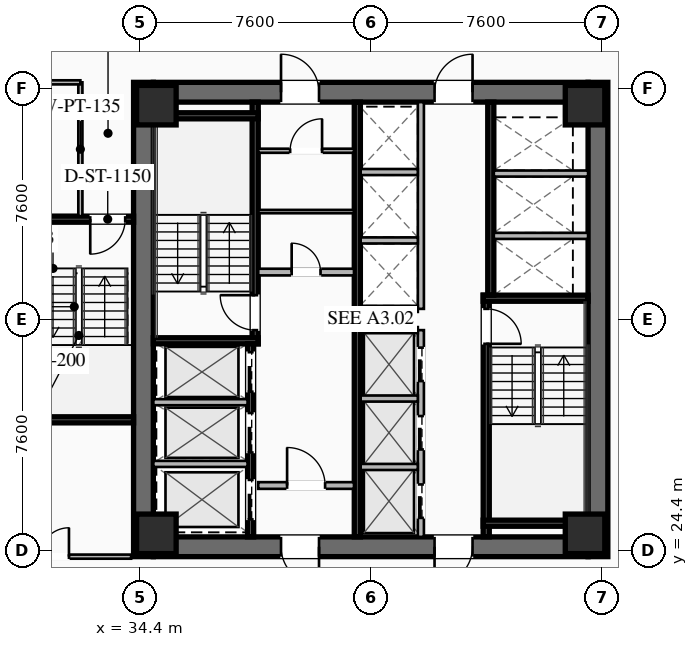
"""IFC4 building model, lengths in metres.
Left out: names, types, materials, properties, quantities, classifications, styles, units other than length and angle.
Written with IfcOpenShell. Run it as: python <this file> out.ifc"""

import sys

from ifc_helpers import new_model, si_unit, direction, frame, frame_2d, origin, origin_2d, place, context, subcontext, project, spatial, rectangle, hollow_rectangle, extrude, element, fill, save


model = new_model("IFC4")
c1 = context("Model", 3, precision=1e-05, world=origin(), true_north=direction((0.0, 1.0)))
c2 = subcontext(c1, "Body", "Model", "MODEL_VIEW")
j1 = project(units=[si_unit("LENGTHUNIT", "METRE"), si_unit("PLANEANGLEUNIT", "RADIAN")], contexts=[c1])
p1 = place(None, origin())
s1 = spatial("IfcSite", under=j1, at=p1, CompositionType="ELEMENT")
p2 = place(p1, origin())
s2 = spatial("IfcBuilding", under=s1, at=p2, CompositionType="ELEMENT")
p3 = place(p2, frame((0.0, 0.0, 70.75)))
s3 = spatial("IfcBuildingStorey", under=s2, at=p3, CompositionType="ELEMENT", Elevation=70.75)
for number, where, z_axis, x_axis in (
    (1, (34.525, 24.2, 0.0), (0.0, 0.0, 1.0), (0.0, 1.0, 0.0)),
    (2, (49.475, 39.8, 0.0), (0.0, 0.0, 1.0), (0.0, -1.0, 0.0)),
):
    element("IfcWall", number, at=place(p3, frame(where, z_axis=z_axis, x_axis=x_axis)), inside=s3, PredefinedType="SHEAR", context=c2, shape_type="SweptSolid", body=[
        extrude(rectangle(XDim=15.6, YDim=0.65, at=frame_2d((7.8, 0.0))), origin(), (0.0, 0.0, 1.0), 3.55),
    ])
p4 = place(p3, frame((49.15, 24.525, 0.0), z_axis=(0.0, 0.0, 1.0), x_axis=(-1.0, 0.0, 0.0)))
e3 = element("IfcWall", 3, at=p4, inside=s3, PredefinedType="SHEAR", context=c2, shape_type="SweptSolid", body=[
    extrude(rectangle(XDim=14.3, YDim=0.65, at=frame_2d((7.15, 0.0))), origin(), (0.0, 0.0, 1.0), 3.55),
])
p5 = place(p4, frame((8.85, 0.0, 0.0)))
e4 = element("IfcOpeningElement", 4, at=p5, cuts=e3, PredefinedType="OPENING", context=c2, shape_type="SweptSolid", body=[
    extrude(rectangle(XDim=1.25, YDim=2.25, at=frame_2d((0.625, 1.125))), frame((0.0, 0.335, 0.0), z_axis=(0.0, -1.0, 0.0), x_axis=(1.0, 0.0, 0.0)), (0.0, 0.0, 1.0), 0.67),
])
p6 = place(p4, frame((3.8, 0.0, 0.0)))
e5 = element("IfcOpeningElement", 5, at=p6, cuts=e3, PredefinedType="OPENING", context=c2, shape_type="SweptSolid", body=[
    extrude(rectangle(XDim=1.25, YDim=2.25, at=frame_2d((0.625, 1.125))), frame((0.0, 0.335, 0.0), z_axis=(0.0, -1.0, 0.0), x_axis=(1.0, 0.0, 0.0)), (0.0, 0.0, 1.0), 0.67),
])
p7 = place(p3, frame((34.85, 39.475, 0.0), z_axis=(0.0, 0.0, 1.0), x_axis=(1.0, 0.0, 0.0)))
e6 = element("IfcWall", 6, at=p7, inside=s3, PredefinedType="SHEAR", context=c2, shape_type="SweptSolid", body=[
    extrude(rectangle(XDim=14.3, YDim=0.65, at=frame_2d((7.15, 0.0))), origin(), (0.0, 0.0, 1.0), 3.55),
])
p8 = place(p7, frame((4.2, 0.0, 0.0)))
e7 = element("IfcOpeningElement", 7, at=p8, cuts=e6, PredefinedType="OPENING", context=c2, shape_type="SweptSolid", body=[
    extrude(rectangle(XDim=1.25, YDim=2.25, at=frame_2d((0.625, 1.125))), frame((0.0, 0.335, 0.0), z_axis=(0.0, -1.0, 0.0), x_axis=(1.0, 0.0, 0.0)), (0.0, 0.0, 1.0), 0.67),
])
p9 = place(p7, frame((9.25, 0.0, 0.0)))
e8 = element("IfcOpeningElement", 8, at=p9, cuts=e6, PredefinedType="OPENING", context=c2, shape_type="SweptSolid", body=[
    extrude(rectangle(XDim=1.25, YDim=2.25, at=frame_2d((0.625, 1.125))), frame((0.0, 0.335, 0.0), z_axis=(0.0, -1.0, 0.0), x_axis=(1.0, 0.0, 0.0)), (0.0, 0.0, 1.0), 0.67),
])
for number, where, z_axis, x_axis in (
    (9, (34.95, 24.95, 0.0), (0.0, 0.0, 1.0), (1.0, 0.0, 0.0)),
    (10, (49.05, 24.95, 0.0), (0.0, 0.0, 1.0), (1.0, 0.0, 0.0)),
    (11, (49.05, 39.05, 0.0), (0.0, 0.0, 1.0), (1.0, 0.0, 0.0)),
    (12, (34.95, 39.05, 0.0), (0.0, 0.0, 1.0), (1.0, 0.0, 0.0)),
):
    element("IfcColumn", number, at=place(p3, frame(where, z_axis=z_axis, x_axis=x_axis)), inside=s3, PredefinedType="COLUMN", context=c2, shape_type="SweptSolid", body=[
        extrude(hollow_rectangle(XDim=1.3, YDim=1.3, WallThickness=0.05, at=origin_2d()), origin(), (0.0, 0.0, 1.0), 3.35),
    ])
p10 = place(p3, frame((38.2, 31.2, 0.0), z_axis=(0.0, 0.0, 1.0), x_axis=(0.0, 1.0, 0.0)))
e13 = element("IfcWall", 13, at=p10, inside=s3, PredefinedType="SHEAR", context=c2, shape_type="SweptSolid", body=[
    extrude(rectangle(XDim=7.95, YDim=0.2, at=frame_2d((3.975, 0.0))), origin(), (0.0, 0.0, 1.0), 3.35),
])
p11 = place(p10, frame((0.45, 0.0, 0.0)))
e14 = element("IfcOpeningElement", 14, at=p11, cuts=e13, PredefinedType="OPENING", context=c2, shape_type="SweptSolid", body=[
    extrude(rectangle(XDim=1.15, YDim=2.2, at=frame_2d((0.575, 1.1))), frame((0.0, 0.11, 0.0), z_axis=(0.0, -1.0, 0.0), x_axis=(1.0, 0.0, 0.0)), (0.0, 0.0, 1.0), 0.22),
])
for number, where, z_axis, x_axis in (
    (15, (34.85, 31.3, 0.0), (0.0, 0.0, 1.0), (1.0, 0.0, 0.0)),
    (16, (34.85, 38.7, 0.0), (0.0, 0.0, 1.0), (1.0, 0.0, 0.0)),
):
    element("IfcWall", number, at=place(p3, frame(where, z_axis=z_axis, x_axis=x_axis)), inside=s3, PredefinedType="SHEAR", context=c2, shape_type="SweptSolid", body=[
        extrude(rectangle(XDim=3.45, YDim=0.2, at=frame_2d((1.725, 0.0))), origin(), (0.0, 0.0, 1.0), 3.35),
    ])
p12 = place(p3, frame((45.8, 32.8, 0.0), z_axis=(0.0, 0.0, 1.0), x_axis=(0.0, -1.0, 0.0)))
e17 = element("IfcWall", 17, at=p12, inside=s3, PredefinedType="SHEAR", context=c2, shape_type="SweptSolid", body=[
    extrude(rectangle(XDim=7.95, YDim=0.2, at=frame_2d((3.975, 0.0))), origin(), (0.0, 0.0, 1.0), 3.35),
])
p13 = place(p12, frame((0.45, 0.0, 0.0)))
e18 = element("IfcOpeningElement", 18, at=p13, cuts=e17, PredefinedType="OPENING", context=c2, shape_type="SweptSolid", body=[
    extrude(rectangle(XDim=1.15, YDim=2.2, at=frame_2d((0.575, 1.1))), frame((0.0, 0.11, 0.0), z_axis=(0.0, -1.0, 0.0), x_axis=(1.0, 0.0, 0.0)), (0.0, 0.0, 1.0), 0.22),
])
for number, where, z_axis, x_axis in (
    (19, (45.7, 32.7, 0.0), (0.0, 0.0, 1.0), (1.0, 0.0, 0.0)),
    (20, (45.7, 25.3, 0.0), (0.0, 0.0, 1.0), (1.0, 0.0, 0.0)),
):
    element("IfcWall", number, at=place(p3, frame(where, z_axis=z_axis, x_axis=x_axis)), inside=s3, PredefinedType="SHEAR", context=c2, shape_type="SweptSolid", body=[
        extrude(rectangle(XDim=3.45, YDim=0.2, at=frame_2d((1.725, 0.0))), origin(), (0.0, 0.0, 1.0), 3.35),
    ])
p14 = place(p3, frame((41.56, 24.85, 0.0), z_axis=(0.0, 0.0, 1.0), x_axis=(0.0, 1.0, 0.0)))
e21 = element("IfcWall", 21, at=p14, inside=s3, PredefinedType="SHEAR", context=c2, shape_type="SweptSolid", body=[
    extrude(rectangle(XDim=14.3, YDim=0.2, at=frame_2d((7.15, 0.0))), origin(), (0.0, 0.0, 1.0), 3.35),
])
p15 = place(p3, frame((38.3, 33.56, 0.0), z_axis=(0.0, 0.0, 1.0), x_axis=(1.0, 0.0, 0.0)))
e22 = element("IfcWall", 22, at=p15, inside=s3, PredefinedType="SOLIDWALL", context=c2, shape_type="SweptSolid", body=[
    extrude(rectangle(XDim=3.15, YDim=0.22, at=frame_2d((1.575, 0.0))), origin(), (0.0, 0.0, 1.0), 2.703),
])
p16 = place(p15, frame((1.1, 0.0, 0.0)))
e23 = element("IfcOpeningElement", 23, at=p16, cuts=e22, PredefinedType="OPENING", context=c2, shape_type="SweptSolid", body=[
    extrude(rectangle(XDim=0.95, YDim=2.05, at=frame_2d((0.475, 1.025))), frame((0.0, 0.12, 0.0), z_axis=(0.0, -1.0, 0.0), x_axis=(1.0, 0.0, 0.0)), (0.0, 0.0, 1.0), 0.24),
])
p17 = place(p3, frame((38.3, 26.54, 0.0), z_axis=(0.0, 0.0, 1.0), x_axis=(1.0, 0.0, 0.0)))
e24 = element("IfcWall", 24, at=p17, inside=s3, PredefinedType="SOLIDWALL", context=c2, shape_type="SweptSolid", body=[
    extrude(rectangle(XDim=3.15, YDim=0.22, at=frame_2d((1.575, 0.0))), origin(), (0.0, 0.0, 1.0), 2.703),
])
p18 = place(p17, frame((0.95, 0.0, 0.0)))
e25 = element("IfcOpeningElement", 25, at=p18, cuts=e24, PredefinedType="OPENING", context=c2, shape_type="SweptSolid", body=[
    extrude(rectangle(XDim=1.25, YDim=2.25, at=frame_2d((0.625, 1.125))), frame((0.0, 0.12, 0.0), z_axis=(0.0, -1.0, 0.0), x_axis=(1.0, 0.0, 0.0)), (0.0, 0.0, 1.0), 0.24),
])
p19 = place(p3, frame((38.05, 24.85, 0.0), z_axis=(0.0, 0.0, 1.0), x_axis=(0.0, 1.0, 0.0)))
e26 = element("IfcWall", 26, at=p19, inside=s3, PredefinedType="SHEAR", context=c2, shape_type="SweptSolid", body=[
    extrude(rectangle(XDim=6.35, YDim=0.2, at=frame_2d((3.175, 0.0))), origin(), (0.0, 0.0, 1.0), 3.35),
])
p20 = place(p19, frame((4.775, 0.0, 0.0)))
e27 = element("IfcOpeningElement", 27, at=p20, cuts=e26, PredefinedType="OPENING", context=c2, shape_type="SweptSolid", body=[
    extrude(rectangle(XDim=1.3, YDim=2.25, at=frame_2d((0.65, 1.125))), frame((0.0, 0.11, 0.0), z_axis=(0.0, -1.0, 0.0), x_axis=(1.0, 0.0, 0.0)), (0.0, 0.0, 1.0), 0.22),
])
p21 = place(p19, frame((2.775, 0.0, 0.0)))
e28 = element("IfcOpeningElement", 28, at=p21, cuts=e26, PredefinedType="OPENING", context=c2, shape_type="SweptSolid", body=[
    extrude(rectangle(XDim=1.3, YDim=2.25, at=frame_2d((0.65, 1.125))), frame((0.0, 0.11, 0.0), z_axis=(0.0, -1.0, 0.0), x_axis=(1.0, 0.0, 0.0)), (0.0, 0.0, 1.0), 0.22),
])
p22 = place(p19, frame((0.575, 0.0, 0.0)))
e29 = element("IfcOpeningElement", 29, at=p22, cuts=e26, PredefinedType="OPENING", context=c2, shape_type="SweptSolid", body=[
    extrude(rectangle(XDim=1.3, YDim=2.25, at=frame_2d((0.65, 1.125))), frame((0.0, 0.11, 0.0), z_axis=(0.0, -1.0, 0.0), x_axis=(1.0, 0.0, 0.0)), (0.0, 0.0, 1.0), 0.22),
])
for number, where, z_axis, x_axis in (
    (30, (34.85, 27.25, 0.0), (0.0, 0.0, 1.0), (1.0, 0.0, 0.0)),
    (31, (34.85, 29.28, 0.0), (0.0, 0.0, 1.0), (1.0, 0.0, 0.0)),
):
    element("IfcWall", number, at=place(p3, frame(where, z_axis=z_axis, x_axis=x_axis)), inside=s3, PredefinedType="SOLIDWALL", context=c2, shape_type="SweptSolid", body=[
        extrude(rectangle(XDim=3.1, YDim=0.2, at=frame_2d((1.55, 0.0))), origin(), (0.0, 0.0, 1.0), 3.35),
    ])
p23 = place(p3, frame((45.95, 39.15, 0.0), z_axis=(0.0, 0.0, 1.0), x_axis=(0.0, -1.0, 0.0)))
e32 = element("IfcWall", 32, at=p23, inside=s3, PredefinedType="SHEAR", context=c2, shape_type="SweptSolid", body=[
    extrude(rectangle(XDim=6.35, YDim=0.2, at=frame_2d((3.175, 0.0))), origin(), (0.0, 0.0, 1.0), 3.35),
])
for number, where, z_axis, x_axis in (
    (33, (46.05, 34.75, 0.0), (0.0, 0.0, 1.0), (1.0, 0.0, 0.0)),
    (34, (46.05, 36.8, 0.0), (0.0, 0.0, 1.0), (1.0, 0.0, 0.0)),
):
    element("IfcWall", number, at=place(p3, frame(where, z_axis=z_axis, x_axis=x_axis)), inside=s3, PredefinedType="SOLIDWALL", context=c2, shape_type="SweptSolid", body=[
        extrude(rectangle(XDim=3.1, YDim=0.2, at=frame_2d((1.55, 0.0))), origin(), (0.0, 0.0, 1.0), 3.35),
    ])
p24 = place(p3, frame((38.3, 37.55, 0.0), z_axis=(0.0, 0.0, 1.0), x_axis=(1.0, 0.0, 0.0)))
e35 = element("IfcWall", 35, at=p24, inside=s3, PredefinedType="PARTITIONING", context=c2, shape_type="SweptSolid", body=[
    extrude(rectangle(XDim=3.15, YDim=0.135, at=frame_2d((1.575, 0.0))), origin(), (0.0, 0.0, 1.0), 2.703),
])
p25 = place(p24, frame((1.05, 0.0, 0.0)))
e36 = element("IfcOpeningElement", 36, at=p25, cuts=e35, PredefinedType="OPENING", context=c2, shape_type="SweptSolid", body=[
    extrude(rectangle(XDim=1.05, YDim=2.2, at=frame_2d((0.525, 1.1))), frame((0.0, 0.077, 0.0), z_axis=(0.0, -1.0, 0.0), x_axis=(1.0, 0.0, 0.0)), (0.0, 0.0, 1.0), 0.155),
])
p26 = place(p3, frame((38.3, 35.55, 0.0), z_axis=(0.0, 0.0, 1.0), x_axis=(1.0, 0.0, 0.0)))
e37 = element("IfcWall", 37, at=p26, inside=s3, PredefinedType="PARTITIONING", context=c2, shape_type="SweptSolid", body=[
    extrude(rectangle(XDim=3.15, YDim=0.11, at=frame_2d((1.575, 0.0))), origin(), (0.0, 0.0, 1.0), 2.703),
])
p27 = place(p3, frame((43.65, 24.85, 0.0), z_axis=(0.0, 0.0, 1.0), x_axis=(0.0, 1.0, 0.0)))
e38 = element("IfcWall", 38, at=p27, inside=s3, PredefinedType="SOLIDWALL", context=c2, shape_type="SweptSolid", body=[
    extrude(rectangle(XDim=6.8, YDim=0.2, at=frame_2d((3.4, 0.0))), origin(), (0.0, 0.0, 1.0), 3.35),
])
p28 = place(p27, frame((0.625, 0.0, 0.0)))
e39 = element("IfcOpeningElement", 39, at=p28, cuts=e38, PredefinedType="OPENING", context=c2, shape_type="SweptSolid", body=[
    extrude(rectangle(XDim=1.1, YDim=2.2, at=frame_2d((0.55, 1.1))), frame((0.0, 0.11, 0.0), z_axis=(0.0, -1.0, 0.0), x_axis=(1.0, 0.0, 0.0)), (0.0, 0.0, 1.0), 0.22),
])
p29 = place(p27, frame((2.875, 0.0, 0.0)))
e40 = element("IfcOpeningElement", 40, at=p29, cuts=e38, PredefinedType="OPENING", context=c2, shape_type="SweptSolid", body=[
    extrude(rectangle(XDim=1.1, YDim=2.2, at=frame_2d((0.55, 1.1))), frame((0.0, 0.11, 0.0), z_axis=(0.0, -1.0, 0.0), x_axis=(1.0, 0.0, 0.0)), (0.0, 0.0, 1.0), 0.22),
])
p30 = place(p27, frame((5.125, 0.0, 0.0)))
e41 = element("IfcOpeningElement", 41, at=p30, cuts=e38, PredefinedType="OPENING", context=c2, shape_type="SweptSolid", body=[
    extrude(rectangle(XDim=1.1, YDim=2.2, at=frame_2d((0.55, 1.1))), frame((0.0, 0.11, 0.0), z_axis=(0.0, -1.0, 0.0), x_axis=(1.0, 0.0, 0.0)), (0.0, 0.0, 1.0), 0.22),
])
for number, where, z_axis, x_axis in (
    (42, (41.67, 27.15, 0.0), (0.0, 0.0, 1.0), (1.0, 0.0, 0.0)),
    (43, (41.67, 29.4, 0.0), (0.0, 0.0, 1.0), (1.0, 0.0, 0.0)),
    (44, (41.67, 31.65, 0.0), (0.0, 0.0, 1.0), (1.0, 0.0, 0.0)),
):
    element("IfcWall", number, at=place(p3, frame(where, z_axis=z_axis, x_axis=x_axis)), inside=s3, PredefinedType="SOLIDWALL", context=c2, shape_type="SweptSolid", body=[
        extrude(rectangle(XDim=1.88, YDim=0.2, at=frame_2d((0.94, 0.0))), origin(), (0.0, 0.0, 1.0), 3.35),
    ])
p31 = place(p3, frame((43.65, 32.35, 0.0), z_axis=(0.0, 0.0, 1.0), x_axis=(0.0, 1.0, 0.0)))
e45 = element("IfcWall", 45, at=p31, inside=s3, PredefinedType="SOLIDWALL", context=c2, shape_type="SweptSolid", body=[
    extrude(rectangle(XDim=6.8, YDim=0.2, at=frame_2d((3.4, 0.0))), origin(), (0.0, 0.0, 1.0), 3.35),
])
for number, where, z_axis, x_axis in (
    (46, (41.67, 32.35, 0.0), (0.0, 0.0, 1.0), (1.0, 0.0, 0.0)),
    (47, (41.67, 34.6, 0.0), (0.0, 0.0, 1.0), (1.0, 0.0, 0.0)),
    (48, (41.67, 36.85, 0.0), (0.0, 0.0, 1.0), (1.0, 0.0, 0.0)),
):
    element("IfcWall", number, at=place(p3, frame(where, z_axis=z_axis, x_axis=x_axis)), inside=s3, PredefinedType="SOLIDWALL", context=c2, shape_type="SweptSolid", body=[
        extrude(rectangle(XDim=1.88, YDim=0.2, at=frame_2d((0.94, 0.0))), origin(), (0.0, 0.0, 1.0), 3.35),
    ])
p32 = place(p3, frame((34.2, 35.3, 0.0), z_axis=(0.0, 0.0, 1.0), x_axis=(-1.0, 0.0, 0.0)))
e49 = element("IfcWall", 49, at=p32, inside=s3, PredefinedType="SHEAR", context=c2, shape_type="SweptSolid", body=[
    extrude(rectangle(XDim=3.4, YDim=0.2, at=frame_2d((1.7, 0.0))), origin(), (0.0, 0.0, 1.0), 3.35),
])
p33 = place(p32, frame((0.275, 0.0, 0.0)))
e50 = element("IfcOpeningElement", 50, at=p33, cuts=e49, PredefinedType="OPENING", context=c2, shape_type="SweptSolid", body=[
    extrude(rectangle(XDim=1.15, YDim=2.2, at=frame_2d((0.575, 1.1))), frame((0.0, 0.11, 0.0), z_axis=(0.0, -1.0, 0.0), x_axis=(1.0, 0.0, 0.0)), (0.0, 0.0, 1.0), 0.22),
])
p34 = place(p3, frame((30.8, 28.7, 0.0), z_axis=(0.0, 0.0, 1.0), x_axis=(1.0, 0.0, 0.0)))
e51 = element("IfcWall", 51, at=p34, inside=s3, PredefinedType="SHEAR", context=c2, shape_type="SweptSolid", body=[
    extrude(rectangle(XDim=3.4, YDim=0.2, at=frame_2d((1.7, 0.0))), origin(), (0.0, 0.0, 1.0), 3.35),
])
p35 = place(p3, frame((32.45, 35.4, 0.0), z_axis=(0.0, 0.0, 1.0), x_axis=(0.0, 1.0, 0.0)))
e52 = element("IfcWall", 52, at=p35, inside=s3, PredefinedType="PARTITIONING", context=c2, shape_type="SweptSolid", body=[
    extrude(rectangle(XDim=4.4, YDim=0.135, at=frame_2d((2.2, 0.0))), origin(), (0.0, 0.0, 1.0), 2.703),
])
p36 = place(p3, frame((32.45, 39.8, 0.0), z_axis=(0.0, 0.0, 1.0), x_axis=(-1.0, 0.0, 0.0)))
e53 = element("IfcWall", 53, at=p36, inside=s3, PredefinedType="PARTITIONING", context=c2, shape_type="SweptSolid", body=[
    extrude(rectangle(XDim=11.43, YDim=0.135, at=frame_2d((5.715, 0.0))), origin(), (0.0, 0.0, 1.0), 2.703),
])
p37 = place(p36, frame((4.89, 0.0, 0.0)))
e54 = element("IfcOpeningElement", 54, at=p37, cuts=e53, PredefinedType="OPENING", context=c2, shape_type="SweptSolid", body=[
    extrude(rectangle(XDim=0.95, YDim=2.05, at=frame_2d((0.475, 1.025))), frame((0.0, 0.077, 0.0), z_axis=(0.0, -1.0, 0.0), x_axis=(1.0, 0.0, 0.0)), (0.0, 0.0, 1.0), 0.155),
])
p38 = place(p3, frame((21.02, 24.2, 0.0), z_axis=(0.0, 0.0, 1.0), x_axis=(1.0, 0.0, 0.0)))
e55 = element("IfcWall", 55, at=p38, inside=s3, PredefinedType="PARTITIONING", context=c2, shape_type="SweptSolid", body=[
    extrude(rectangle(XDim=13.1, YDim=0.135, at=frame_2d((6.55, 0.0))), origin(), (0.0, 0.0, 1.0), 2.703),
])
p39 = place(p38, frame((10.105, 0.0, 0.0)))
e56 = element("IfcOpeningElement", 56, at=p39, cuts=e55, PredefinedType="OPENING", context=c2, shape_type="SweptSolid", body=[
    extrude(rectangle(XDim=0.95, YDim=2.05, at=frame_2d((0.475, 1.025))), frame((0.0, 0.077, 0.0), z_axis=(0.0, -1.0, 0.0), x_axis=(1.0, 0.0, 0.0)), (0.0, 0.0, 1.0), 0.155),
])
p40 = place(p8, origin())
e57 = element("IfcDoor", 57, at=p40, inside=s3, OperationType="SINGLE_SWING_LEFT", PredefinedType="DOOR", context=c2, shape_type="SweptSolid", body=[
    extrude(rectangle(XDim=1.25, YDim=2.25, at=frame_2d((0.625, 1.125))), frame((0.0, 0.025, 0.0), z_axis=(0.0, -1.0, 0.0), x_axis=(1.0, 0.0, 0.0)), (0.0, 0.0, 1.0), 0.05),
])
fill(e7, e57)
p41 = place(p9, origin())
e58 = element("IfcDoor", 58, at=p41, inside=s3, OperationType="SINGLE_SWING_RIGHT", PredefinedType="DOOR", context=c2, shape_type="SweptSolid", body=[
    extrude(rectangle(XDim=1.25, YDim=2.25, at=frame_2d((0.625, 1.125))), frame((0.0, 0.025, 0.0), z_axis=(0.0, -1.0, 0.0), x_axis=(1.0, 0.0, 0.0)), (0.0, 0.0, 1.0), 0.05),
])
fill(e8, e58)
p42 = place(p5, origin())
e59 = element("IfcDoor", 59, at=p42, inside=s3, OperationType="SINGLE_SWING_LEFT", PredefinedType="DOOR", context=c2, shape_type="SweptSolid", body=[
    extrude(rectangle(XDim=1.25, YDim=2.25, at=frame_2d((0.625, 1.125))), frame((0.0, 0.025, 0.0), z_axis=(0.0, -1.0, 0.0), x_axis=(1.0, 0.0, 0.0)), (0.0, 0.0, 1.0), 0.05),
])
fill(e4, e59)
p43 = place(p6, origin())
e60 = element("IfcDoor", 60, at=p43, inside=s3, OperationType="SINGLE_SWING_RIGHT", PredefinedType="DOOR", context=c2, shape_type="SweptSolid", body=[
    extrude(rectangle(XDim=1.25, YDim=2.25, at=frame_2d((0.625, 1.125))), frame((0.0, 0.025, 0.0), z_axis=(0.0, -1.0, 0.0), x_axis=(1.0, 0.0, 0.0)), (0.0, 0.0, 1.0), 0.05),
])
fill(e5, e60)
p44 = place(p11, origin())
e61 = element("IfcDoor", 61, at=p44, inside=s3, OperationType="SINGLE_SWING_RIGHT", PredefinedType="DOOR", context=c2, shape_type="SweptSolid", body=[
    extrude(rectangle(XDim=1.15, YDim=2.2, at=frame_2d((0.575, 1.1))), frame((0.0, 0.025, 0.0), z_axis=(0.0, -1.0, 0.0), x_axis=(1.0, 0.0, 0.0)), (0.0, 0.0, 1.0), 0.05),
])
fill(e14, e61)
p45 = place(p13, origin())
e62 = element("IfcDoor", 62, at=p45, inside=s3, OperationType="SINGLE_SWING_RIGHT", PredefinedType="DOOR", context=c2, shape_type="SweptSolid", body=[
    extrude(rectangle(XDim=1.15, YDim=2.2, at=frame_2d((0.575, 1.1))), frame((0.0, 0.025, 0.0), z_axis=(0.0, -1.0, 0.0), x_axis=(1.0, 0.0, 0.0)), (0.0, 0.0, 1.0), 0.05),
])
fill(e18, e62)
p46 = place(p18, origin())
e63 = element("IfcDoor", 63, at=p46, inside=s3, OperationType="SINGLE_SWING_LEFT", PredefinedType="DOOR", context=c2, shape_type="SweptSolid", body=[
    extrude(rectangle(XDim=1.25, YDim=2.25, at=frame_2d((0.625, 1.125))), frame((0.0, 0.025, 0.0), z_axis=(0.0, -1.0, 0.0), x_axis=(1.0, 0.0, 0.0)), (0.0, 0.0, 1.0), 0.05),
])
fill(e25, e63)
p47 = place(p25, origin())
e64 = element("IfcDoor", 64, at=p47, inside=s3, OperationType="SINGLE_SWING_RIGHT", PredefinedType="DOOR", context=c2, shape_type="SweptSolid", body=[
    extrude(rectangle(XDim=1.05, YDim=2.2, at=frame_2d((0.525, 1.1))), frame((0.0, 0.025, 0.0), z_axis=(0.0, -1.0, 0.0), x_axis=(1.0, 0.0, 0.0)), (0.0, 0.0, 1.0), 0.05),
])
fill(e36, e64)
p48 = place(p16, origin())
e65 = element("IfcDoor", 65, at=p48, inside=s3, OperationType="SINGLE_SWING_LEFT", PredefinedType="DOOR", context=c2, shape_type="SweptSolid", body=[
    extrude(rectangle(XDim=0.95, YDim=2.05, at=frame_2d((0.475, 1.025))), frame((0.0, 0.025, 0.0), z_axis=(0.0, -1.0, 0.0), x_axis=(1.0, 0.0, 0.0)), (0.0, 0.0, 1.0), 0.05),
])
fill(e23, e65)
p49 = place(p33, origin())
e66 = element("IfcDoor", 66, at=p49, inside=s3, OperationType="SINGLE_SWING_RIGHT", PredefinedType="DOOR", context=c2, shape_type="SweptSolid", body=[
    extrude(rectangle(XDim=1.15, YDim=2.2, at=frame_2d((0.575, 1.1))), frame((0.0, 0.025, 0.0), z_axis=(0.0, -1.0, 0.0), x_axis=(1.0, 0.0, 0.0)), (0.0, 0.0, 1.0), 0.05),
])
fill(e50, e66)
p50 = place(p39, origin())
e67 = element("IfcDoor", 67, at=p50, inside=s3, OperationType="SINGLE_SWING_RIGHT", PredefinedType="DOOR", context=c2, shape_type="SweptSolid", body=[
    extrude(rectangle(XDim=0.95, YDim=2.05, at=frame_2d((0.475, 1.025))), frame((0.0, 0.025, 0.0), z_axis=(0.0, -1.0, 0.0), x_axis=(1.0, 0.0, 0.0)), (0.0, 0.0, 1.0), 0.05),
])
fill(e56, e67)
p51 = place(p20, origin())
e68 = element("IfcDoor", 68, at=p51, inside=s3, OperationType="SLIDING_TO_LEFT", PredefinedType="DOOR", context=c2, shape_type="SweptSolid", body=[
    extrude(rectangle(XDim=1.3, YDim=2.25, at=frame_2d((0.65, 1.125))), frame((0.0, 0.025, 0.0), z_axis=(0.0, -1.0, 0.0), x_axis=(1.0, 0.0, 0.0)), (0.0, 0.0, 1.0), 0.05),
])
fill(e27, e68)
p52 = place(p21, origin())
e69 = element("IfcDoor", 69, at=p52, inside=s3, OperationType="SLIDING_TO_LEFT", PredefinedType="DOOR", context=c2, shape_type="SweptSolid", body=[
    extrude(rectangle(XDim=1.3, YDim=2.25, at=frame_2d((0.65, 1.125))), frame((0.0, 0.025, 0.0), z_axis=(0.0, -1.0, 0.0), x_axis=(1.0, 0.0, 0.0)), (0.0, 0.0, 1.0), 0.05),
])
fill(e28, e69)
p53 = place(p22, origin())
e70 = element("IfcDoor", 70, at=p53, inside=s3, OperationType="SLIDING_TO_LEFT", PredefinedType="DOOR", context=c2, shape_type="SweptSolid", body=[
    extrude(rectangle(XDim=1.3, YDim=2.25, at=frame_2d((0.65, 1.125))), frame((0.0, 0.025, 0.0), z_axis=(0.0, -1.0, 0.0), x_axis=(1.0, 0.0, 0.0)), (0.0, 0.0, 1.0), 0.05),
])
fill(e29, e70)
p54 = place(p28, origin())
e71 = element("IfcDoor", 71, at=p54, inside=s3, OperationType="SLIDING_TO_LEFT", PredefinedType="DOOR", context=c2, shape_type="SweptSolid", body=[
    extrude(rectangle(XDim=1.1, YDim=2.2, at=frame_2d((0.55, 1.1))), frame((0.0, 0.025, 0.0), z_axis=(0.0, -1.0, 0.0), x_axis=(1.0, 0.0, 0.0)), (0.0, 0.0, 1.0), 0.05),
])
fill(e39, e71)
p55 = place(p29, origin())
e72 = element("IfcDoor", 72, at=p55, inside=s3, OperationType="SLIDING_TO_LEFT", PredefinedType="DOOR", context=c2, shape_type="SweptSolid", body=[
    extrude(rectangle(XDim=1.1, YDim=2.2, at=frame_2d((0.55, 1.1))), frame((0.0, 0.025, 0.0), z_axis=(0.0, -1.0, 0.0), x_axis=(1.0, 0.0, 0.0)), (0.0, 0.0, 1.0), 0.05),
])
fill(e40, e72)
p56 = place(p30, origin())
e73 = element("IfcDoor", 73, at=p56, inside=s3, OperationType="SLIDING_TO_LEFT", PredefinedType="DOOR", context=c2, shape_type="SweptSolid", body=[
    extrude(rectangle(XDim=1.1, YDim=2.2, at=frame_2d((0.55, 1.1))), frame((0.0, 0.025, 0.0), z_axis=(0.0, -1.0, 0.0), x_axis=(1.0, 0.0, 0.0)), (0.0, 0.0, 1.0), 0.05),
])
fill(e41, e73)
save(model, sys.argv[1])
